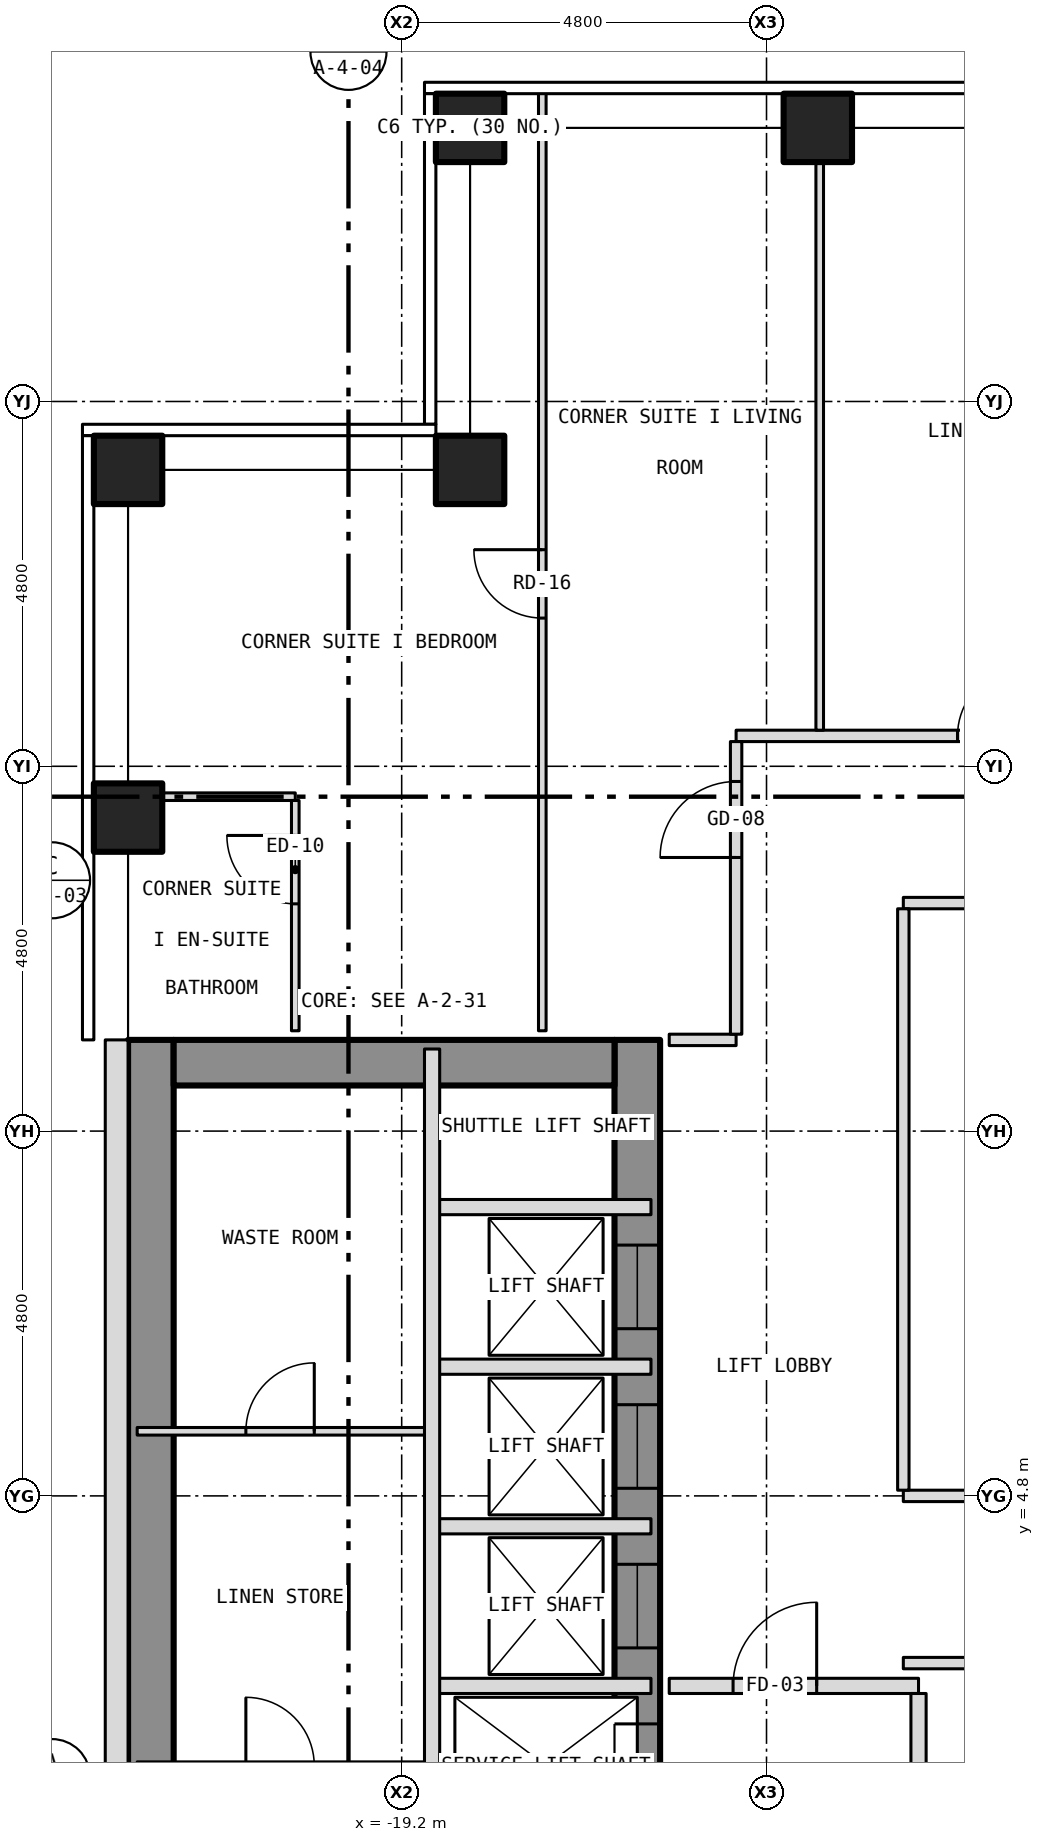
"""IFC4 building model, lengths in metres.
Left out: names, types, materials, properties, quantities, classifications, styles, units other than length and angle.
Written with IfcOpenShell. Run it as: python <this file> out.ifc"""

import sys

from ifc_helpers import new_model, si_unit, direction, frame, frame_2d, origin, origin_2d, place, context, subcontext, project, spatial, rectangle, hollow_rectangle, extrude, element, fill, save


model = new_model("IFC4")
c1 = context("Model", 3, precision=1e-05, world=origin(), true_north=direction((0.0, 1.0)))
c2 = subcontext(c1, "Body", "Model", "MODEL_VIEW")
j1 = project(units=[si_unit("LENGTHUNIT", "METRE"), si_unit("PLANEANGLEUNIT", "RADIAN")], contexts=[c1])
p1 = place(None, origin())
s1 = spatial("IfcSite", under=j1, at=p1, CompositionType="ELEMENT")
p2 = place(p1, origin())
s2 = spatial("IfcBuilding", under=s1, at=p2, CompositionType="ELEMENT")
p3 = place(p2, frame((0.0, 0.0, 113.5)))
s3 = spatial("IfcBuildingStorey", under=s2, at=p3, CompositionType="ELEMENT", Elevation=113.5)
for number, where, z_axis, x_axis in (
    (1, (-18.3, 22.8, -0.15), (0.0, 0.0, 1.0), (1.0, 0.0, 0.0)),
    (2, (-13.725, 22.8, -0.15), (0.0, 0.0, 1.0), (1.0, 0.0, 0.0)),
    (3, (-22.8, 13.725, -0.15), (0.0, 0.0, 1.0), (1.0, 0.0, 0.0)),
    (4, (-22.8, 18.3, -0.15), (0.0, 0.0, 1.0), (1.0, 0.0, 0.0)),
    (5, (-18.3, 18.3, -0.15), (0.0, 0.0, 1.0), (1.0, 0.0, 0.0)),
):
    element("IfcColumn", number, at=place(p3, frame(where, z_axis=z_axis, x_axis=x_axis)), inside=s3, PredefinedType="COLUMN", context=c2, shape_type="SweptSolid", body=[
        extrude(hollow_rectangle(XDim=0.9, YDim=0.9, WallThickness=0.05, at=origin_2d()), origin(), (0.0, 0.0, 1.0), 3.5),
    ])
p4 = place(p3, frame((-16.1, -10.8, 0.0), z_axis=(0.0, 0.0, 1.0), x_axis=(0.0, 1.0, 0.0)))
e6 = element("IfcWall", 6, at=p4, inside=s3, PredefinedType="SHEAR", context=c2, shape_type="SweptSolid", body=[
    extrude(rectangle(XDim=21.6, YDim=0.6, at=frame_2d((10.8, 0.0))), origin(), (0.0, 0.0, 1.0), 3.25),
])
p5 = place(p4, frame((9.4, 0.0, 0.0)))
e7 = element("IfcOpeningElement", 7, at=p5, cuts=e6, PredefinedType="OPENING", context=c2, shape_type="SweptSolid", body=[
    extrude(rectangle(XDim=1.1, YDim=2.1, at=frame_2d((0.55, 1.05))), frame((0.0, 0.312, 0.0), z_axis=(0.0, -1.0, 0.0), x_axis=(1.0, 0.0, 0.0)), (0.0, 0.0, 1.0), 0.624),
])
p6 = place(p4, frame((11.5, 0.0, 0.0)))
e8 = element("IfcOpeningElement", 8, at=p6, cuts=e6, PredefinedType="OPENING", context=c2, shape_type="SweptSolid", body=[
    extrude(rectangle(XDim=1.1, YDim=2.1, at=frame_2d((0.55, 1.05))), frame((0.0, 0.312, 0.0), z_axis=(0.0, -1.0, 0.0), x_axis=(1.0, 0.0, 0.0)), (0.0, 0.0, 1.0), 0.624),
])
p7 = place(p4, frame((13.6, 0.0, 0.0)))
e9 = element("IfcOpeningElement", 9, at=p7, cuts=e6, PredefinedType="OPENING", context=c2, shape_type="SweptSolid", body=[
    extrude(rectangle(XDim=1.1, YDim=2.1, at=frame_2d((0.55, 1.05))), frame((0.0, 0.312, 0.0), z_axis=(0.0, -1.0, 0.0), x_axis=(1.0, 0.0, 0.0)), (0.0, 0.0, 1.0), 0.624),
])
p8 = place(p4, frame((15.7, 0.0, 0.0)))
e10 = element("IfcOpeningElement", 10, at=p8, cuts=e6, PredefinedType="OPENING", context=c2, shape_type="SweptSolid", body=[
    extrude(rectangle(XDim=1.1, YDim=2.1, at=frame_2d((0.55, 1.05))), frame((0.0, 0.312, 0.0), z_axis=(0.0, -1.0, 0.0), x_axis=(1.0, 0.0, 0.0)), (0.0, 0.0, 1.0), 0.624),
])
p9 = place(p4, frame((17.8, 0.0, 0.0)))
e11 = element("IfcOpeningElement", 11, at=p9, cuts=e6, PredefinedType="OPENING", context=c2, shape_type="SweptSolid", body=[
    extrude(rectangle(XDim=1.1, YDim=2.1, at=frame_2d((0.55, 1.05))), frame((0.0, 0.312, 0.0), z_axis=(0.0, -1.0, 0.0), x_axis=(1.0, 0.0, 0.0)), (0.0, 0.0, 1.0), 0.624),
])
p10 = place(p4, frame((0.758, 0.0, 0.0)))
e12 = element("IfcOpeningElement", 12, at=p10, cuts=e6, PredefinedType="OPENING", context=c2, shape_type="SweptSolid", body=[
    extrude(rectangle(XDim=1.1, YDim=2.1, at=frame_2d((0.55, 1.05))), frame((0.0, 0.312, 0.0), z_axis=(0.0, -1.0, 0.0), x_axis=(1.0, 0.0, 0.0)), (0.0, 0.0, 1.0), 0.624),
])
p11 = place(p4, frame((7.5, 0.0, 0.0)))
e13 = element("IfcOpeningElement", 13, at=p11, cuts=e6, PredefinedType="OPENING", context=c2, shape_type="SweptSolid", body=[
    extrude(rectangle(XDim=1.1, YDim=2.1, at=frame_2d((0.55, 1.05))), frame((0.0, 0.312, 0.0), z_axis=(0.0, -1.0, 0.0), x_axis=(1.0, 0.0, 0.0)), (0.0, 0.0, 1.0), 0.624),
])
p12 = place(p3, frame((-22.5, -10.8, 0.0), z_axis=(0.0, 0.0, 1.0), x_axis=(0.0, 1.0, 0.0)))
e14 = element("IfcWall", 14, at=p12, inside=s3, PredefinedType="SHEAR", context=c2, shape_type="SweptSolid", body=[
    extrude(rectangle(XDim=21.6, YDim=0.6, at=frame_2d((10.8, 0.0))), origin(), (0.0, 0.0, 1.0), 3.25),
])
p13 = place(p3, frame((-22.2, 10.5, 0.0), z_axis=(0.0, 0.0, 1.0), x_axis=(1.0, 0.0, 0.0)))
e15 = element("IfcWall", 15, at=p13, inside=s3, PredefinedType="SHEAR", context=c2, shape_type="SweptSolid", body=[
    extrude(rectangle(XDim=5.8, YDim=0.6, at=frame_2d((2.9, 0.0))), origin(), (0.0, 0.0, 1.0), 3.25),
])
p14 = place(p3, frame((-22.95, 10.8, 0.0), z_axis=(0.0, 0.0, 1.0), x_axis=(0.0, -1.0, 0.0)))
e16 = element("IfcWall", 16, at=p14, inside=s3, PredefinedType="SOLIDWALL", context=c2, shape_type="SweptSolid", body=[
    extrude(rectangle(XDim=21.6, YDim=0.3, at=frame_2d((10.8, 0.0))), origin(), (0.0, 0.0, 1.0), 3.5),
])
p15 = place(p14, frame((18.05, 0.0, 1.0)))
e17 = element("IfcOpeningElement", 17, at=p15, cuts=e16, PredefinedType="OPENING", context=c2, shape_type="SweptSolid", body=[
    extrude(rectangle(XDim=0.6, YDim=1.5, at=frame_2d((0.3, 0.75))), frame((0.0, 0.162, 0.0), z_axis=(0.0, -1.0, 0.0), x_axis=(1.0, 0.0, 0.0)), (0.0, 0.0, 1.0), 0.324),
])
p16 = place(p3, frame((-18.8, 2.3, 0.0), z_axis=(0.0, 0.0, 1.0), x_axis=(1.0, 0.0, 0.0)))
e18 = element("IfcWall", 18, at=p16, inside=s3, PredefinedType="PARTITIONING", context=c2, shape_type="SweptSolid", body=[
    extrude(rectangle(XDim=2.88, YDim=0.2, at=frame_2d((1.44, 0.0))), origin(), (0.0, 0.0, 1.0), 3.25),
])
p17 = place(p3, frame((-15.68, 2.3, 0.0), z_axis=(0.0, 0.0, 1.0), x_axis=(1.0, 0.0, 0.0)))
e19 = element("IfcWall", 19, at=p17, inside=s3, PredefinedType="PARTITIONING", context=c2, shape_type="SweptSolid", body=[
    extrude(rectangle(XDim=3.28, YDim=0.2, at=frame_2d((1.64, 0.0))), origin(), (0.0, 0.0, 1.0), 3.35),
])
p18 = place(p17, frame((0.84, 0.0, 0.0)))
e20 = element("IfcOpeningElement", 20, at=p18, cuts=e19, PredefinedType="OPENING", context=c2, shape_type="SweptSolid", body=[
    extrude(rectangle(XDim=1.1, YDim=2.1, at=frame_2d((0.55, 1.05))), frame((0.0, 0.112, 0.0), z_axis=(0.0, -1.0, 0.0), x_axis=(1.0, 0.0, 0.0)), (0.0, 0.0, 1.0), 0.224),
])
p19 = place(p3, frame((-12.6, 2.6, 0.0), z_axis=(0.0, 0.0, 1.0), x_axis=(1.0, 0.0, 0.0)))
e21 = element("IfcWall", 21, at=p19, inside=s3, PredefinedType="PARTITIONING", context=c2, shape_type="SweptSolid", body=[
    extrude(rectangle(XDim=16.7, YDim=0.15, at=frame_2d((8.35, 0.0))), origin(), (0.0, 0.0, 1.0), 3.35),
])
p20 = place(p19, frame((5.85, 0.0, 0.0)))
e22 = element("IfcOpeningElement", 22, at=p20, cuts=e21, PredefinedType="OPENING", context=c2, shape_type="SweptSolid", body=[
    extrude(rectangle(XDim=0.9, YDim=2.1, at=frame_2d((0.45, 1.05))), frame((0.0, 0.087, 0.0), z_axis=(0.0, -1.0, 0.0), x_axis=(1.0, 0.0, 0.0)), (0.0, 0.0, 1.0), 0.174),
])
p21 = place(p3, frame((-18.8, 4.4, 0.0), z_axis=(0.0, 0.0, 1.0), x_axis=(1.0, 0.0, 0.0)))
e23 = element("IfcWall", 23, at=p21, inside=s3, PredefinedType="PARTITIONING", context=c2, shape_type="SweptSolid", body=[
    extrude(rectangle(XDim=2.88, YDim=0.2, at=frame_2d((1.44, 0.0))), origin(), (0.0, 0.0, 1.0), 3.25),
])
p22 = place(p3, frame((-12.6, 4.8, 0.0), z_axis=(0.0, 0.0, 1.0), x_axis=(1.0, 0.0, 0.0)))
e24 = element("IfcWall", 24, at=p22, inside=s3, PredefinedType="PARTITIONING", context=c2, shape_type="SweptSolid", body=[
    extrude(rectangle(XDim=16.7, YDim=0.15, at=frame_2d((8.35, 0.0))), origin(), (0.0, 0.0, 1.0), 3.35),
])
p23 = place(p22, frame((14.2, 0.0, 0.0)))
e25 = element("IfcOpeningElement", 25, at=p23, cuts=e24, PredefinedType="OPENING", context=c2, shape_type="SweptSolid", body=[
    extrude(rectangle(XDim=0.9, YDim=2.1, at=frame_2d((0.45, 1.05))), frame((0.0, 0.087, 0.0), z_axis=(0.0, -1.0, 0.0), x_axis=(1.0, 0.0, 0.0)), (0.0, 0.0, 1.0), 0.174),
])
p24 = place(p3, frame((-22.68, 5.65, 0.0), z_axis=(0.0, 0.0, 1.0), x_axis=(1.0, 0.0, 0.0)))
e26 = element("IfcWall", 26, at=p24, inside=s3, PredefinedType="PARTITIONING", context=c2, shape_type="SweptSolid", body=[
    extrude(rectangle(XDim=3.88, YDim=0.1, at=frame_2d((1.94, 0.0))), origin(), (0.0, 0.0, 1.0), 3.25),
])
p25 = place(p24, frame((1.43, 0.0, 0.0)))
e27 = element("IfcOpeningElement", 27, at=p25, cuts=e26, PredefinedType="OPENING", context=c2, shape_type="SweptSolid", body=[
    extrude(rectangle(XDim=0.9, YDim=2.1, at=frame_2d((0.45, 1.05))), frame((0.0, 0.062, 0.0), z_axis=(0.0, -1.0, 0.0), x_axis=(1.0, 0.0, 0.0)), (0.0, 0.0, 1.0), 0.124),
])
for number, where, z_axis, x_axis in (
    (28, (-18.8, 6.5, 0.0), (0.0, 0.0, 1.0), (1.0, 0.0, 0.0)),
    (29, (-18.8, 8.6, 0.0), (0.0, 0.0, 1.0), (1.0, 0.0, 0.0)),
):
    element("IfcWall", number, at=place(p3, frame(where, z_axis=z_axis, x_axis=x_axis)), inside=s3, PredefinedType="PARTITIONING", context=c2, shape_type="SweptSolid", body=[
        extrude(rectangle(XDim=2.88, YDim=0.2, at=frame_2d((1.44, 0.0))), origin(), (0.0, 0.0, 1.0), 3.25),
    ])
p26 = place(p3, frame((-15.68, 10.8, 0.0), z_axis=(0.0, 0.0, 1.0), x_axis=(1.0, 0.0, 0.0)))
e30 = element("IfcWall", 30, at=p26, inside=s3, PredefinedType="PARTITIONING", context=c2, shape_type="SweptSolid", body=[
    extrude(rectangle(XDim=0.88, YDim=0.15, at=frame_2d((0.44, 0.0))), origin(), (0.0, 0.0, 1.0), 3.35),
])
p27 = place(p3, frame((-12.6, 12.6, 0.0), z_axis=(0.0, 0.0, 1.0), x_axis=(1.0, 0.0, 0.0)))
e31 = element("IfcWall", 31, at=p27, inside=s3, PredefinedType="PARTITIONING", context=c2, shape_type="SweptSolid", body=[
    extrude(rectangle(XDim=16.7, YDim=0.15, at=frame_2d((8.35, 0.0))), origin(), (0.0, 0.0, 1.0), 3.35),
])
p28 = place(p27, frame((14.2, 0.0, 0.0)))
e32 = element("IfcOpeningElement", 32, at=p28, cuts=e31, PredefinedType="OPENING", context=c2, shape_type="SweptSolid", body=[
    extrude(rectangle(XDim=0.9, YDim=2.1, at=frame_2d((0.45, 1.05))), frame((0.0, 0.087, 0.0), z_axis=(0.0, -1.0, 0.0), x_axis=(1.0, 0.0, 0.0)), (0.0, 0.0, 1.0), 0.174),
])
p29 = place(p27, frame((5.85, 0.0, 0.0)))
e33 = element("IfcOpeningElement", 33, at=p29, cuts=e31, PredefinedType="OPENING", context=c2, shape_type="SweptSolid", body=[
    extrude(rectangle(XDim=0.9, YDim=2.1, at=frame_2d((0.45, 1.05))), frame((0.0, 0.087, 0.0), z_axis=(0.0, -1.0, 0.0), x_axis=(1.0, 0.0, 0.0)), (0.0, 0.0, 1.0), 0.174),
])
p30 = place(p3, frame((-22.68, 14.0, 0.0), z_axis=(0.0, 0.0, 1.0), x_axis=(1.0, 0.0, 0.0)))
e34 = element("IfcWall", 34, at=p30, inside=s3, PredefinedType="PARTITIONING", context=c2, shape_type="SweptSolid", body=[
    extrude(rectangle(XDim=2.08, YDim=0.1, at=frame_2d((1.04, 0.0))), origin(), (0.0, 0.0, 1.0), 3.35),
])
p31 = place(p3, frame((-14.8, 14.8, 0.0), z_axis=(0.0, 0.0, 1.0), x_axis=(1.0, 0.0, 0.0)))
e35 = element("IfcWall", 35, at=p31, inside=s3, PredefinedType="PARTITIONING", context=c2, shape_type="SweptSolid", body=[
    extrude(rectangle(XDim=29.6, YDim=0.15, at=frame_2d((14.8, 0.0))), origin(), (0.0, 0.0, 1.0), 3.35),
])
p32 = place(p31, frame((2.913, 0.0, 0.0)))
e36 = element("IfcOpeningElement", 36, at=p32, cuts=e35, PredefinedType="OPENING", context=c2, shape_type="SweptSolid", body=[
    extrude(rectangle(XDim=0.9, YDim=2.1, at=frame_2d((0.45, 1.05))), frame((0.0, 0.087, 0.0), z_axis=(0.0, -1.0, 0.0), x_axis=(1.0, 0.0, 0.0)), (0.0, 0.0, 1.0), 0.174),
])
p33 = place(p31, frame((7.481, 0.0, 0.0)))
e37 = element("IfcOpeningElement", 37, at=p33, cuts=e35, PredefinedType="OPENING", context=c2, shape_type="SweptSolid", body=[
    extrude(rectangle(XDim=1.0, YDim=2.1, at=frame_2d((0.5, 1.05))), frame((0.0, 0.087, 0.0), z_axis=(0.0, -1.0, 0.0), x_axis=(1.0, 0.0, 0.0)), (0.0, 0.0, 1.0), 0.174),
])
p34 = place(p31, frame((19.104, 0.0, 0.0)))
e38 = element("IfcOpeningElement", 38, at=p34, cuts=e35, PredefinedType="OPENING", context=c2, shape_type="SweptSolid", body=[
    extrude(rectangle(XDim=1.0, YDim=2.1, at=frame_2d((0.5, 1.05))), frame((0.0, 0.087, 0.0), z_axis=(0.0, -1.0, 0.0), x_axis=(1.0, 0.0, 0.0)), (0.0, 0.0, 1.0), 0.174),
])
p35 = place(p31, frame((23.494, 0.0, 0.0)))
e39 = element("IfcOpeningElement", 39, at=p35, cuts=e35, PredefinedType="OPENING", context=c2, shape_type="SweptSolid", body=[
    extrude(rectangle(XDim=1.0, YDim=2.1, at=frame_2d((0.5, 1.05))), frame((0.0, 0.087, 0.0), z_axis=(0.0, -1.0, 0.0), x_axis=(1.0, 0.0, 0.0)), (0.0, 0.0, 1.0), 0.174),
])
p36 = place(p3, frame((-20.6, 10.92, 0.0), z_axis=(0.0, 0.0, 1.0), x_axis=(0.0, 1.0, 0.0)))
e40 = element("IfcWall", 40, at=p36, inside=s3, PredefinedType="PARTITIONING", context=c2, shape_type="SweptSolid", body=[
    extrude(rectangle(XDim=3.03, YDim=0.1, at=frame_2d((1.515, 0.0))), origin(), (0.0, 0.0, 1.0), 3.35),
])
p37 = place(p36, frame((1.67, 0.0, 0.0)))
e41 = element("IfcOpeningElement", 41, at=p37, cuts=e40, PredefinedType="OPENING", context=c2, shape_type="SweptSolid", body=[
    extrude(rectangle(XDim=0.9, YDim=2.1, at=frame_2d((0.45, 1.05))), frame((0.0, 0.062, 0.0), z_axis=(0.0, -1.0, 0.0), x_axis=(1.0, 0.0, 0.0)), (0.0, 0.0, 1.0), 0.124),
])
p38 = place(p3, frame((-18.8, -1.8, 0.0), z_axis=(0.0, 0.0, 1.0), x_axis=(0.0, 1.0, 0.0)))
e42 = element("IfcWall", 42, at=p38, inside=s3, PredefinedType="PARTITIONING", context=c2, shape_type="SweptSolid", body=[
    extrude(rectangle(XDim=12.48, YDim=0.2, at=frame_2d((6.24, 0.0))), origin(), (0.0, 0.0, 1.0), 3.25),
])
p39 = place(p3, frame((-17.35, 10.92, 0.0), z_axis=(0.0, 0.0, 1.0), x_axis=(0.0, 1.0, 0.0)))
e43 = element("IfcWall", 43, at=p39, inside=s3, PredefinedType="PARTITIONING", context=c2, shape_type="SweptSolid", body=[
    extrude(rectangle(XDim=12.36, YDim=0.1, at=frame_2d((6.18, 0.0))), origin(), (0.0, 0.0, 1.0), 3.35),
])
p40 = place(p39, frame((5.43, 0.0, 0.0)))
e44 = element("IfcOpeningElement", 44, at=p40, cuts=e43, PredefinedType="OPENING", context=c2, shape_type="SweptSolid", body=[
    extrude(rectangle(XDim=0.9, YDim=2.1, at=frame_2d((0.45, 1.05))), frame((0.0, 0.062, 0.0), z_axis=(0.0, -1.0, 0.0), x_axis=(1.0, 0.0, 0.0)), (0.0, 0.0, 1.0), 0.124),
])
p41 = place(p3, frame((-14.8, 10.875, 0.0), z_axis=(0.0, 0.0, 1.0), x_axis=(0.0, 1.0, 0.0)))
e45 = element("IfcWall", 45, at=p41, inside=s3, PredefinedType="PARTITIONING", context=c2, shape_type="SweptSolid", body=[
    extrude(rectangle(XDim=3.85, YDim=0.15, at=frame_2d((1.925, 0.0))), origin(), (0.0, 0.0, 1.0), 3.35),
])
p42 = place(p41, frame((2.325, 0.0, 0.0)))
e46 = element("IfcOpeningElement", 46, at=p42, cuts=e45, PredefinedType="OPENING", context=c2, shape_type="SweptSolid", body=[
    extrude(rectangle(XDim=1.0, YDim=2.1, at=frame_2d((0.5, 1.05))), frame((0.0, 0.087, 0.0), z_axis=(0.0, -1.0, 0.0), x_axis=(1.0, 0.0, 0.0)), (0.0, 0.0, 1.0), 0.174),
])
p43 = place(p3, frame((-13.7, 14.875, 0.0), z_axis=(0.0, 0.0, 1.0), x_axis=(0.0, 1.0, 0.0)))
e47 = element("IfcWall", 47, at=p43, inside=s3, PredefinedType="PARTITIONING", context=c2, shape_type="SweptSolid", body=[
    extrude(rectangle(XDim=7.805, YDim=0.1, at=frame_2d((3.902, 0.0))), origin(), (0.0, 0.0, 1.0), 3.35),
])
p44 = place(p3, frame((-12.6, 4.875, 0.0), z_axis=(0.0, 0.0, 1.0), x_axis=(0.0, 1.0, 0.0)))
e48 = element("IfcWall", 48, at=p44, inside=s3, PredefinedType="PARTITIONING", context=c2, shape_type="SweptSolid", body=[
    extrude(rectangle(XDim=7.65, YDim=0.15, at=frame_2d((3.825, 0.0))), origin(), (0.0, 0.0, 1.0), 3.35),
])
p45 = place(p3, frame((-12.4, -1.8, 0.0), z_axis=(0.0, 0.0, 1.0), x_axis=(0.0, 1.0, 0.0)))
e49 = element("IfcWall", 49, at=p45, inside=s3, PredefinedType="PARTITIONING", context=c2, shape_type="SweptSolid", body=[
    extrude(rectangle(XDim=4.0, YDim=0.2, at=frame_2d((2.0, 0.0))), origin(), (0.0, 0.0, 1.0), 3.35),
])
p46 = place(p6, origin())
e50 = element("IfcDoor", 50, at=p46, inside=s3, OperationType="SLIDING_TO_LEFT", PredefinedType="DOOR", context=c2, shape_type="SweptSolid", body=[
    extrude(rectangle(XDim=1.1, YDim=2.1, at=frame_2d((0.55, 1.05))), frame((0.0, 0.025, 0.0), z_axis=(0.0, -1.0, 0.0), x_axis=(1.0, 0.0, 0.0)), (0.0, 0.0, 1.0), 0.05),
])
fill(e8, e50)
p47 = place(p7, origin())
e51 = element("IfcDoor", 51, at=p47, inside=s3, OperationType="SLIDING_TO_LEFT", PredefinedType="DOOR", context=c2, shape_type="SweptSolid", body=[
    extrude(rectangle(XDim=1.1, YDim=2.1, at=frame_2d((0.55, 1.05))), frame((0.0, 0.025, 0.0), z_axis=(0.0, -1.0, 0.0), x_axis=(1.0, 0.0, 0.0)), (0.0, 0.0, 1.0), 0.05),
])
fill(e9, e51)
p48 = place(p8, origin())
e52 = element("IfcDoor", 52, at=p48, inside=s3, OperationType="SLIDING_TO_LEFT", PredefinedType="DOOR", context=c2, shape_type="SweptSolid", body=[
    extrude(rectangle(XDim=1.1, YDim=2.1, at=frame_2d((0.55, 1.05))), frame((0.0, 0.025, 0.0), z_axis=(0.0, -1.0, 0.0), x_axis=(1.0, 0.0, 0.0)), (0.0, 0.0, 1.0), 0.05),
])
fill(e10, e52)
p49 = place(p9, origin())
e53 = element("IfcDoor", 53, at=p49, inside=s3, OperationType="SLIDING_TO_LEFT", PredefinedType="DOOR", context=c2, shape_type="SweptSolid", body=[
    extrude(rectangle(XDim=1.1, YDim=2.1, at=frame_2d((0.55, 1.05))), frame((0.0, 0.025, 0.0), z_axis=(0.0, -1.0, 0.0), x_axis=(1.0, 0.0, 0.0)), (0.0, 0.0, 1.0), 0.05),
])
fill(e11, e53)
p50 = place(p25, origin())
e54 = element("IfcDoor", 54, at=p50, inside=s3, OperationType="SINGLE_SWING_RIGHT", PredefinedType="DOOR", context=c2, shape_type="SweptSolid", body=[
    extrude(rectangle(XDim=0.9, YDim=2.1, at=frame_2d((0.45, 1.05))), frame((0.0, 0.025, 0.0), z_axis=(0.0, -1.0, 0.0), x_axis=(1.0, 0.0, 0.0)), (0.0, 0.0, 1.0), 0.05),
])
fill(e27, e54)
p51 = place(p18, origin())
e55 = element("IfcDoor", 55, at=p51, inside=s3, OperationType="SINGLE_SWING_RIGHT", PredefinedType="DOOR", context=c2, shape_type="SweptSolid", body=[
    extrude(rectangle(XDim=1.1, YDim=2.1, at=frame_2d((0.55, 1.05))), frame((0.0, 0.025, 0.0), z_axis=(0.0, -1.0, 0.0), x_axis=(1.0, 0.0, 0.0)), (0.0, 0.0, 1.0), 0.05),
])
fill(e20, e55)
p52 = place(p32, origin())
e56 = element("IfcDoor", 56, at=p52, inside=s3, OperationType="SINGLE_SWING_RIGHT", PredefinedType="DOOR", context=c2, shape_type="SweptSolid", body=[
    extrude(rectangle(XDim=0.9, YDim=2.1, at=frame_2d((0.45, 1.05))), frame((0.0, 0.025, 0.0), z_axis=(0.0, -1.0, 0.0), x_axis=(1.0, 0.0, 0.0)), (0.0, 0.0, 1.0), 0.05),
])
fill(e36, e56)
p53 = place(p42, origin())
e57 = element("IfcDoor", 57, at=p53, inside=s3, OperationType="SINGLE_SWING_LEFT", PredefinedType="DOOR", context=c2, shape_type="SweptSolid", body=[
    extrude(rectangle(XDim=1.0, YDim=2.1, at=frame_2d((0.5, 1.05))), frame((0.0, 0.025, 0.0), z_axis=(0.0, -1.0, 0.0), x_axis=(1.0, 0.0, 0.0)), (0.0, 0.0, 1.0), 0.05),
])
fill(e46, e57)
p54 = place(p40, origin())
e58 = element("IfcDoor", 58, at=p54, inside=s3, OperationType="SINGLE_SWING_RIGHT", PredefinedType="DOOR", context=c2, shape_type="SweptSolid", body=[
    extrude(rectangle(XDim=0.9, YDim=2.1, at=frame_2d((0.45, 1.05))), frame((0.0, 0.025, 0.0), z_axis=(0.0, -1.0, 0.0), x_axis=(1.0, 0.0, 0.0)), (0.0, 0.0, 1.0), 0.05),
])
fill(e44, e58)
p55 = place(p37, origin())
e59 = element("IfcDoor", 59, at=p55, inside=s3, OperationType="SINGLE_SWING_RIGHT", PredefinedType="DOOR", context=c2, shape_type="SweptSolid", body=[
    extrude(rectangle(XDim=0.9, YDim=2.1, at=frame_2d((0.45, 1.05))), frame((0.0, 0.025, 0.0), z_axis=(0.0, -1.0, 0.0), x_axis=(1.0, 0.0, 0.0)), (0.0, 0.0, 1.0), 0.05),
])
fill(e41, e59)
save(model, sys.argv[1])
